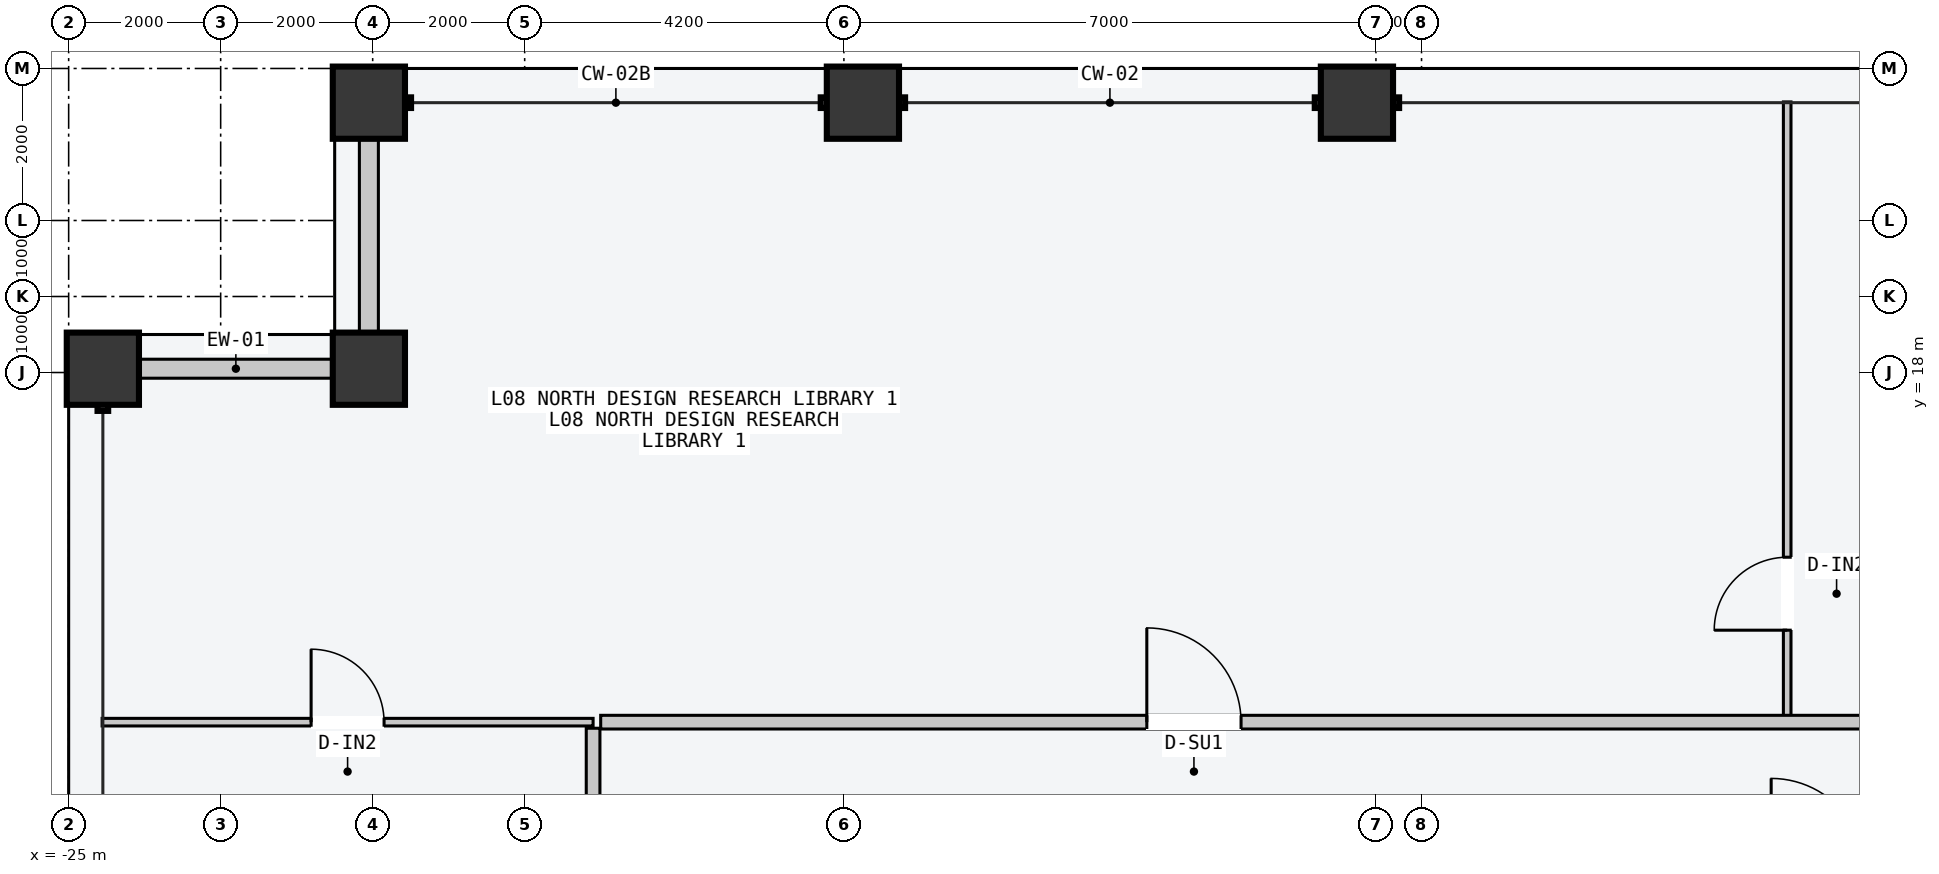
"""IFC4 building model, lengths in metres.
Left out: names, types, materials, properties, quantities, classifications, styles, units other than length and angle.
Written with IfcOpenShell. Run it as: python <this file> out.ifc"""

import sys

from ifc_helpers import new_model, si_unit, direction, frame, frame_2d, origin, origin_2d, place, context, subcontext, project, spatial, rectangle, hollow_rectangle, extrude, element, fill, save


model = new_model("IFC4")
c1 = context("Model", 3, precision=1e-05, world=origin(), true_north=direction((0.0, 1.0)))
c2 = subcontext(c1, "Body", "Model", "MODEL_VIEW")
j1 = project(units=[si_unit("LENGTHUNIT", "METRE"), si_unit("PLANEANGLEUNIT", "RADIAN")], contexts=[c1])
p1 = place(None, origin())
s1 = spatial("IfcSite", under=j1, at=p1, CompositionType="ELEMENT")
p2 = place(p1, origin())
s2 = spatial("IfcBuilding", under=s1, at=p2, CompositionType="ELEMENT")
p3 = place(p2, frame((0.0, 0.0, 34.8)))
s3 = spatial("IfcBuildingStorey", under=s2, at=p3, CompositionType="ELEMENT", Elevation=34.8)
for number, where, z_axis, x_axis in (
    (1, (-21.05, 21.55, 0.0), (0.0, 0.0, 1.0), (1.0, 0.0, 0.0)),
    (2, (-14.55, 21.55, 0.0), (0.0, 0.0, 1.0), (1.0, 0.0, 0.0)),
    (3, (-8.05, 21.55, 0.0), (0.0, 0.0, 1.0), (1.0, 0.0, 0.0)),
    (4, (-24.55, 18.05, 0.0), (0.0, 0.0, 1.0), (0.0, 1.0, 0.0)),
    (5, (-21.05, 18.05, 0.0), (0.0, 0.0, 1.0), (1.0, 0.0, 0.0)),
):
    element("IfcColumn", number, at=place(p3, frame(where, z_axis=z_axis, x_axis=x_axis)), inside=s3, PredefinedType="COLUMN", context=c2, shape_type="SweptSolid", body=[
        extrude(hollow_rectangle(XDim=0.95, YDim=0.95, WallThickness=0.048, at=origin_2d()), origin(), (0.0, 0.0, 1.0), 3.6),
    ])
for number, where, z_axis, x_axis in (
    (6, (-24.065, 18.05, 0.0), (0.0, 0.0, 1.0), (1.0, 0.0, 0.0)),
    (7, (-21.05, 18.535, 0.0), (0.0, 0.0, 1.0), (0.0, 1.0, 0.0)),
):
    element("IfcWall", number, at=place(p3, frame(where, z_axis=z_axis, x_axis=x_axis)), inside=s3, PredefinedType="STANDARD", context=c2, shape_type="SweptSolid", body=[
        extrude(rectangle(XDim=2.53, YDim=0.25, at=frame_2d((1.265, 0.0))), origin(), (0.0, 0.0, 1.0), 2.7),
    ])
p4 = place(p3, frame((-2.389, 13.46, 0.0), z_axis=(0.0, 0.0, 1.0), x_axis=(0.0, 1.0, 0.0)))
e8 = element("IfcWall", 8, at=p4, inside=s3, PredefinedType="PARTITIONING", context=c2, shape_type="SweptSolid", body=[
    extrude(rectangle(XDim=8.1, YDim=0.1, at=frame_2d((4.05, 0.0))), origin(), (0.0, 0.0, 1.0), 3.4),
])
p5 = place(p4, frame((1.15, 0.0, 0.0)))
e9 = element("IfcOpeningElement", 9, at=p5, cuts=e8, PredefinedType="OPENING", context=c2, shape_type="SweptSolid", body=[
    extrude(rectangle(XDim=0.96, YDim=2.18, at=frame_2d((0.48, 1.09))), frame((0.0, 0.06, 0.0), z_axis=(0.0, -1.0, 0.0), x_axis=(1.0, 0.0, 0.0)), (0.0, 0.0, 1.0), 0.12),
])
p6 = place(p3, frame((-18.0, 13.4, 0.0), z_axis=(0.0, 0.0, 1.0), x_axis=(1.0, 0.0, 0.0)))
e10 = element("IfcWall", 10, at=p6, inside=s3, PredefinedType="PARTITIONING", context=c2, shape_type="SweptSolid", body=[
    extrude(rectangle(XDim=36.0, YDim=0.18, at=frame_2d((18.0, 0.0))), origin(), (0.0, 0.0, 1.0), 3.4),
])
p7 = place(p6, frame((7.185, 0.0, 0.0)))
e11 = element("IfcOpeningElement", 11, at=p7, cuts=e10, PredefinedType="OPENING", context=c2, shape_type="SweptSolid", body=[
    extrude(rectangle(XDim=1.24, YDim=2.24, at=frame_2d((0.62, 1.12))), frame((0.0, 0.1, 0.0), z_axis=(0.0, -1.0, 0.0), x_axis=(1.0, 0.0, 0.0)), (0.0, 0.0, 1.0), 0.2),
])
p8 = place(p6, frame((21.083, 0.0, 0.0)))
e12 = element("IfcOpeningElement", 12, at=p8, cuts=e10, PredefinedType="OPENING", context=c2, shape_type="SweptSolid", body=[
    extrude(rectangle(XDim=1.4, YDim=2.2, at=frame_2d((0.7, 1.1))), frame((0.0, 0.1, 0.0), z_axis=(0.0, -1.0, 0.0), x_axis=(1.0, 0.0, 0.0)), (0.0, 0.0, 1.0), 0.2),
])
p9 = place(p6, frame((31.528, 0.0, 0.0)))
e13 = element("IfcOpeningElement", 13, at=p9, cuts=e10, PredefinedType="OPENING", context=c2, shape_type="SweptSolid", body=[
    extrude(rectangle(XDim=0.9, YDim=2.15, at=frame_2d((0.45, 1.075))), frame((0.0, 0.1, 0.0), z_axis=(0.0, -1.0, 0.0), x_axis=(1.0, 0.0, 0.0)), (0.0, 0.0, 1.0), 0.2),
])
p10 = place(p3, frame((-24.56, 13.4, 0.0), z_axis=(0.0, 0.0, 1.0), x_axis=(1.0, 0.0, 0.0)))
e14 = element("IfcWall", 14, at=p10, inside=s3, PredefinedType="PARTITIONING", context=c2, shape_type="SweptSolid", body=[
    extrude(rectangle(XDim=6.46, YDim=0.1, at=frame_2d((3.23, 0.0))), origin(), (0.0, 0.0, 1.0), 3.4),
])
p11 = place(p10, frame((2.75, 0.0, 0.0)))
e15 = element("IfcOpeningElement", 15, at=p11, cuts=e14, PredefinedType="OPENING", context=c2, shape_type="SweptSolid", body=[
    extrude(rectangle(XDim=0.96, YDim=2.18, at=frame_2d((0.48, 1.09))), frame((0.0, 0.06, 0.0), z_axis=(0.0, -1.0, 0.0), x_axis=(1.0, 0.0, 0.0)), (0.0, 0.0, 1.0), 0.12),
])
p12 = place(p3, frame((-18.1, -13.32, 0.0), z_axis=(0.0, 0.0, 1.0), x_axis=(0.0, 1.0, 0.0)))
e16 = element("IfcWall", 16, at=p12, inside=s3, PredefinedType="PARTITIONING", context=c2, shape_type="SweptSolid", body=[
    extrude(rectangle(XDim=26.64, YDim=0.18, at=frame_2d((13.32, 0.0))), origin(), (0.0, 0.0, 1.0), 3.4),
])
p13 = place(p12, frame((3.829, 0.0, 0.0)))
e17 = element("IfcOpeningElement", 17, at=p13, cuts=e16, PredefinedType="OPENING", context=c2, shape_type="SweptSolid", body=[
    extrude(rectangle(XDim=1.4, YDim=2.2, at=frame_2d((0.7, 1.1))), frame((0.0, 0.1, 0.0), z_axis=(0.0, -1.0, 0.0), x_axis=(1.0, 0.0, 0.0)), (0.0, 0.0, 1.0), 0.2),
])
p14 = place(p12, frame((17.399, 0.0, 0.0)))
e18 = element("IfcOpeningElement", 18, at=p14, cuts=e16, PredefinedType="OPENING", context=c2, shape_type="SweptSolid", body=[
    extrude(rectangle(XDim=0.9, YDim=2.15, at=frame_2d((0.45, 1.075))), frame((0.0, 0.1, 0.0), z_axis=(0.0, -1.0, 0.0), x_axis=(1.0, 0.0, 0.0)), (0.0, 0.0, 1.0), 0.2),
])
p15 = place(p5, origin())
e19 = element("IfcDoor", 19, at=p15, inside=s3, OperationType="SINGLE_SWING_LEFT", PredefinedType="DOOR", context=c2, shape_type="SweptSolid", body=[
    extrude(rectangle(XDim=0.96, YDim=2.18, at=frame_2d((0.48, 1.09))), frame((0.0, 0.025, 0.0), z_axis=(0.0, -1.0, 0.0), x_axis=(1.0, 0.0, 0.0)), (0.0, 0.0, 1.0), 0.05),
])
fill(e9, e19)
p16 = place(p7, origin())
e20 = element("IfcDoor", 20, at=p16, inside=s3, OperationType="SINGLE_SWING_LEFT", PredefinedType="DOOR", context=c2, shape_type="SweptSolid", body=[
    extrude(rectangle(XDim=1.24, YDim=2.24, at=frame_2d((0.62, 1.12))), frame((0.0, 0.025, 0.0), z_axis=(0.0, -1.0, 0.0), x_axis=(1.0, 0.0, 0.0)), (0.0, 0.0, 1.0), 0.05),
])
fill(e11, e20)
p17 = place(p11, origin())
e21 = element("IfcDoor", 21, at=p17, inside=s3, OperationType="SINGLE_SWING_LEFT", PredefinedType="DOOR", context=c2, shape_type="SweptSolid", body=[
    extrude(rectangle(XDim=0.96, YDim=2.18, at=frame_2d((0.48, 1.09))), frame((0.0, 0.025, 0.0), z_axis=(0.0, -1.0, 0.0), x_axis=(1.0, 0.0, 0.0)), (0.0, 0.0, 1.0), 0.05),
])
fill(e15, e21)
save(model, sys.argv[1])
